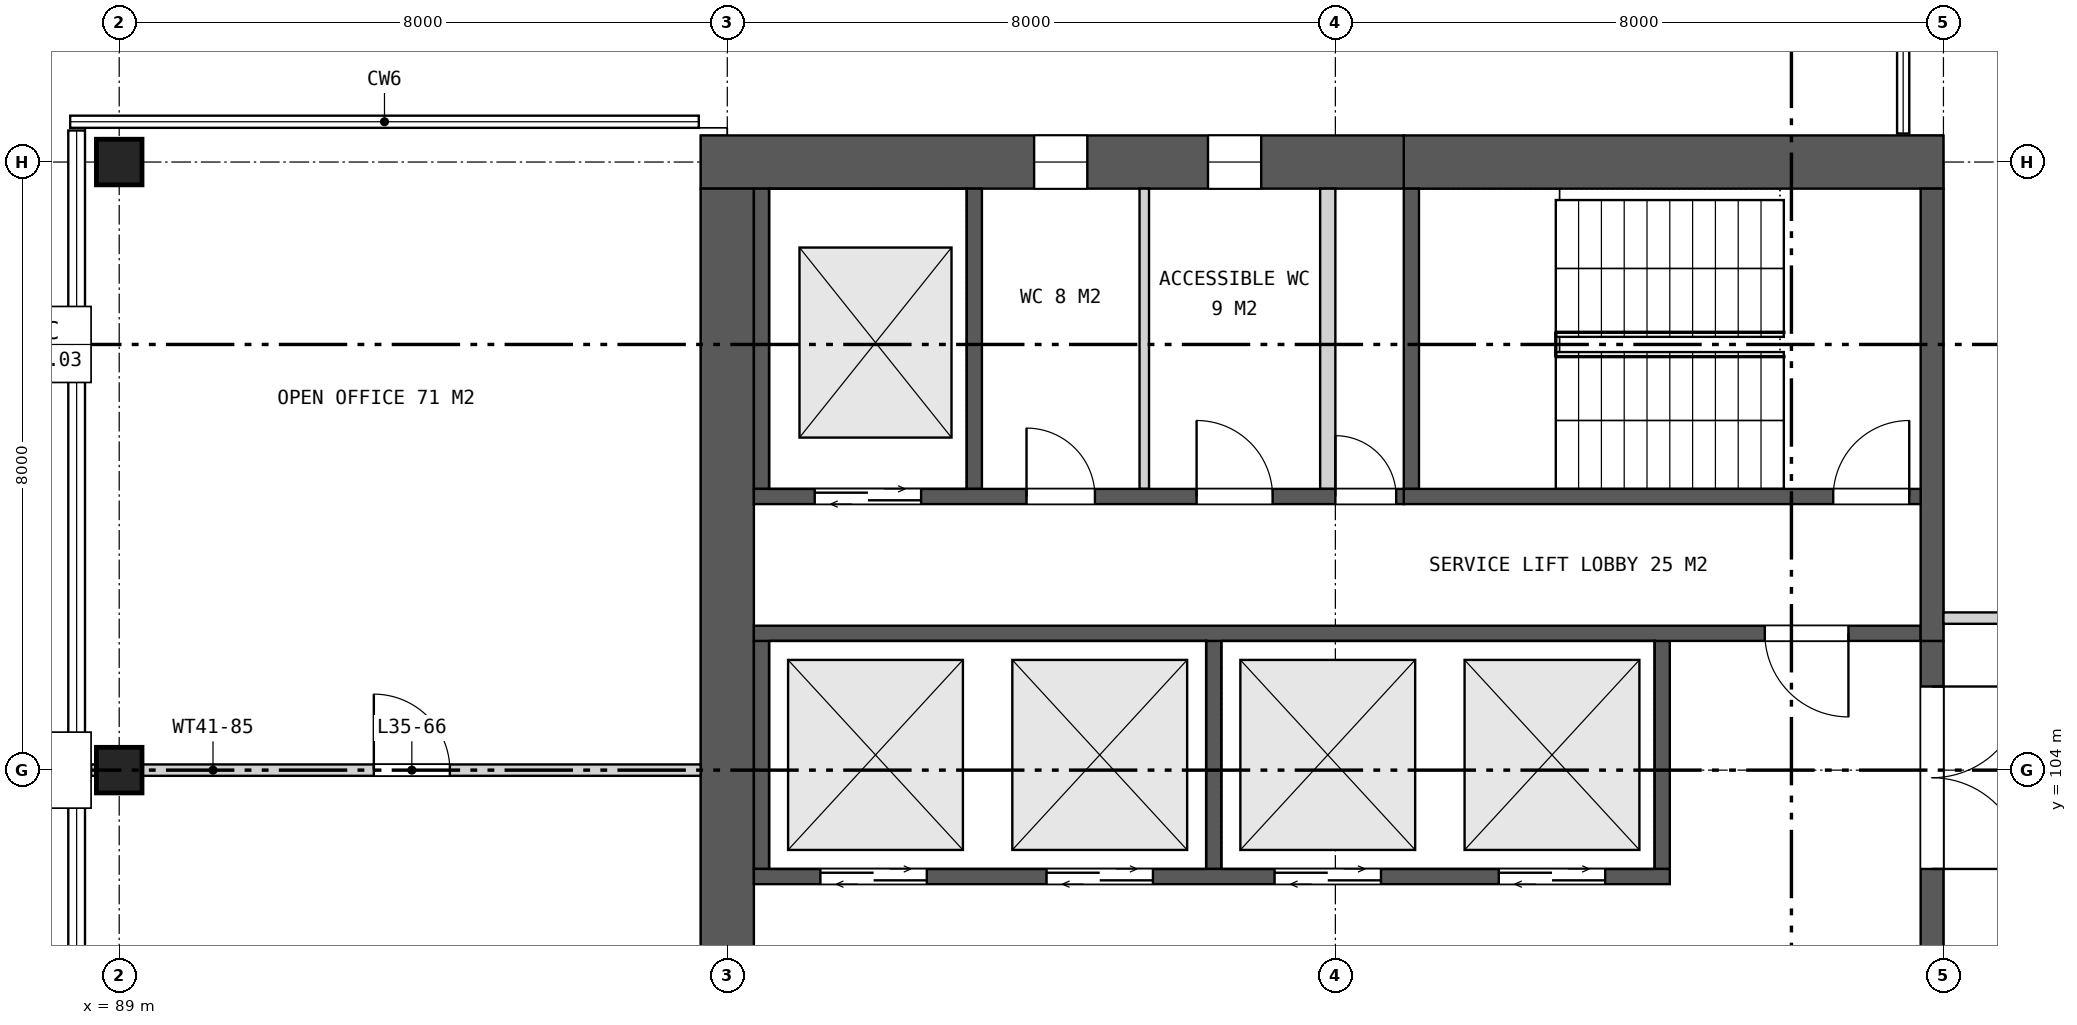
"""IFC4 building model, lengths in metres.
Left out: names, types, materials, properties, quantities, classifications, styles, units other than length and angle.
Written with IfcOpenShell. Run it as: python <this file> out.ifc"""

import sys

from ifc_helpers import new_model, si_unit, direction, frame, frame_2d, origin, origin_2d, place, context, subcontext, project, spatial, rectangle, extrude, element, fill, save


model = new_model("IFC4")
c1 = context("Model", 3, precision=1e-05, world=origin(), true_north=direction((0.0, 1.0)))
c2 = subcontext(c1, "Body", "Model", "MODEL_VIEW")
j1 = project(units=[si_unit("LENGTHUNIT", "METRE"), si_unit("PLANEANGLEUNIT", "RADIAN")], contexts=[c1])
p1 = place(None, origin())
s1 = spatial("IfcSite", under=j1, at=p1, CompositionType="ELEMENT")
p2 = place(p1, origin())
s2 = spatial("IfcBuilding", under=s1, at=p2, CompositionType="ELEMENT")
p3 = place(p2, frame((0.0, 0.0, 167.3)))
s3 = spatial("IfcBuildingStorey", under=s2, at=p3, CompositionType="ELEMENT", Elevation=167.3)
for number, where, z_axis, x_axis in (
    (1, (89.0, 104.0, 0.0), (0.0, 0.0, 1.0), (1.0, 0.0, 0.0)),
    (2, (89.0, 112.0, 0.0), (0.0, 0.0, 1.0), (1.0, 0.0, 0.0)),
):
    element("IfcColumn", number, at=place(p3, frame(where, z_axis=z_axis, x_axis=x_axis)), inside=s3, PredefinedType="COLUMN", context=c2, shape_type="SweptSolid", body=[
        extrude(rectangle(XDim=0.6, YDim=0.6, at=origin_2d()), origin(), (0.0, 0.0, 1.0), 4.2),
    ])
p4 = place(p3, frame((113.0, 112.0, 0.0), z_axis=(0.0, 0.0, 1.0), x_axis=(-1.0, 0.0, 0.0)))
e3 = element("IfcWall", 3, at=p4, inside=s3, PredefinedType="SHEAR", context=c2, shape_type="SweptSolid", body=[
    extrude(rectangle(XDim=7.1, YDim=0.7, at=frame_2d((3.55, 0.0))), origin(), (0.0, 0.0, 1.0), 4.2),
])
p5 = place(p3, frame((105.9, 112.0, 0.0), z_axis=(0.0, 0.0, 1.0), x_axis=(-1.0, 0.0, 0.0)))
e4 = element("IfcWall", 4, at=p5, inside=s3, PredefinedType="SHEAR", context=c2, shape_type="SweptSolid", body=[
    extrude(rectangle(XDim=9.25, YDim=0.7, at=frame_2d((4.625, 0.0))), origin(), (0.0, 0.0, 1.0), 4.2),
])
p6 = place(p5, frame((1.876, 0.0, 1.5)))
e5 = element("IfcOpeningElement", 5, at=p6, cuts=e4, PredefinedType="OPENING", context=c2, shape_type="SweptSolid", body=[
    extrude(rectangle(XDim=0.7, YDim=0.9, at=frame_2d((0.35, 0.45))), frame((0.0, 0.36, 0.0), z_axis=(0.0, -1.0, 0.0), x_axis=(1.0, 0.0, 0.0)), (0.0, 0.0, 1.0), 0.72),
])
p7 = place(p5, frame((4.163, 0.0, 1.5)))
e6 = element("IfcOpeningElement", 6, at=p7, cuts=e4, PredefinedType="OPENING", context=c2, shape_type="SweptSolid", body=[
    extrude(rectangle(XDim=0.7, YDim=0.9, at=frame_2d((0.35, 0.45))), frame((0.0, 0.36, 0.0), z_axis=(0.0, -1.0, 0.0), x_axis=(1.0, 0.0, 0.0)), (0.0, 0.0, 1.0), 0.72),
])
p8 = place(p3, frame((97.0, 111.65, 0.0), z_axis=(0.0, 0.0, 1.0), x_axis=(0.0, -1.0, 0.0)))
e7 = element("IfcWall", 7, at=p8, inside=s3, PredefinedType="SHEAR", context=c2, shape_type="SweptSolid", body=[
    extrude(rectangle(XDim=23.3, YDim=0.7, at=frame_2d((11.65, 0.0))), origin(), (0.0, 0.0, 1.0), 4.2),
])
p9 = place(p8, frame((10.45, 0.0, 0.0)))
e8 = element("IfcOpeningElement", 8, at=p9, cuts=e7, PredefinedType="OPENING", context=c2, shape_type="SweptSolid", body=[
    extrude(rectangle(XDim=2.4, YDim=2.4, at=frame_2d((1.2, 1.2))), frame((0.0, 0.36, 0.0), z_axis=(0.0, -1.0, 0.0), x_axis=(1.0, 0.0, 0.0)), (0.0, 0.0, 1.0), 0.72),
])
p10 = place(p3, frame((112.85, 105.7, 0.0), z_axis=(0.0, 0.0, 1.0), x_axis=(0.0, -1.0, 0.0)))
e9 = element("IfcWall", 9, at=p10, inside=s3, PredefinedType="SHEAR", context=c2, shape_type="SweptSolid", body=[
    extrude(rectangle(XDim=11.4, YDim=0.3, at=frame_2d((5.7, 0.0))), origin(), (0.0, 0.0, 1.0), 4.2),
])
p11 = place(p10, frame((0.6, 0.0, 0.0)))
e10 = element("IfcOpeningElement", 10, at=p11, cuts=e9, PredefinedType="OPENING", context=c2, shape_type="SweptSolid", body=[
    extrude(rectangle(XDim=2.4, YDim=2.4, at=frame_2d((1.2, 1.2))), frame((0.0, 0.16, 0.0), z_axis=(0.0, -1.0, 0.0), x_axis=(1.0, 0.0, 0.0)), (0.0, 0.0, 1.0), 0.32),
])
p12 = place(p10, frame((4.5, 0.0, 0.0)))
e11 = element("IfcOpeningElement", 11, at=p12, cuts=e9, PredefinedType="OPENING", context=c2, shape_type="SweptSolid", body=[
    extrude(rectangle(XDim=2.4, YDim=2.4, at=frame_2d((1.2, 1.2))), frame((0.0, 0.16, 0.0), z_axis=(0.0, -1.0, 0.0), x_axis=(1.0, 0.0, 0.0)), (0.0, 0.0, 1.0), 0.32),
])
p13 = place(p10, frame((8.4, 0.0, 0.0)))
e12 = element("IfcOpeningElement", 12, at=p13, cuts=e9, PredefinedType="OPENING", context=c2, shape_type="SweptSolid", body=[
    extrude(rectangle(XDim=2.4, YDim=2.4, at=frame_2d((1.2, 1.2))), frame((0.0, 0.16, 0.0), z_axis=(0.0, -1.0, 0.0), x_axis=(1.0, 0.0, 0.0)), (0.0, 0.0, 1.0), 0.32),
])
for number, where, z_axis, x_axis in (
    (13, (109.3, 105.7, 0.0), (0.0, 0.0, 1.0), (0.0, -1.0, 0.0)),
    (14, (103.4, 105.7, 0.0), (0.0, 0.0, 1.0), (0.0, -1.0, 0.0)),
    (15, (97.45, 105.7, 0.0), (0.0, 0.0, 1.0), (0.0, -1.0, 0.0)),
):
    element("IfcWall", number, at=place(p3, frame(where, z_axis=z_axis, x_axis=x_axis)), inside=s3, PredefinedType="SHEAR", context=c2, shape_type="SweptSolid", body=[
        extrude(rectangle(XDim=3.0, YDim=0.2, at=frame_2d((1.5, 0.0))), origin(), (0.0, 0.0, 1.0), 4.2),
    ])
p14 = place(p3, frame((109.4, 102.6, 0.0), z_axis=(0.0, 0.0, 1.0), x_axis=(-1.0, 0.0, 0.0)))
e16 = element("IfcWall", 16, at=p14, inside=s3, PredefinedType="SHEAR", context=c2, shape_type="SweptSolid", body=[
    extrude(rectangle(XDim=12.05, YDim=0.2, at=frame_2d((6.025, 0.0))), origin(), (0.0, 0.0, 1.0), 4.2),
])
p15 = place(p14, frame((0.85, 0.0, 0.0)))
e17 = element("IfcOpeningElement", 17, at=p15, cuts=e16, PredefinedType="OPENING", context=c2, shape_type="SweptSolid", body=[
    extrude(rectangle(XDim=1.4, YDim=2.1, at=frame_2d((0.7, 1.05))), frame((0.0, 0.11, 0.0), z_axis=(0.0, -1.0, 0.0), x_axis=(1.0, 0.0, 0.0)), (0.0, 0.0, 1.0), 0.22),
])
p16 = place(p14, frame((3.8, 0.0, 0.0)))
e18 = element("IfcOpeningElement", 18, at=p16, cuts=e16, PredefinedType="OPENING", context=c2, shape_type="SweptSolid", body=[
    extrude(rectangle(XDim=1.4, YDim=2.1, at=frame_2d((0.7, 1.05))), frame((0.0, 0.11, 0.0), z_axis=(0.0, -1.0, 0.0), x_axis=(1.0, 0.0, 0.0)), (0.0, 0.0, 1.0), 0.22),
])
p17 = place(p14, frame((6.8, 0.0, 0.0)))
e19 = element("IfcOpeningElement", 19, at=p17, cuts=e16, PredefinedType="OPENING", context=c2, shape_type="SweptSolid", body=[
    extrude(rectangle(XDim=1.4, YDim=2.1, at=frame_2d((0.7, 1.05))), frame((0.0, 0.11, 0.0), z_axis=(0.0, -1.0, 0.0), x_axis=(1.0, 0.0, 0.0)), (0.0, 0.0, 1.0), 0.22),
])
p18 = place(p14, frame((9.775, 0.0, 0.0)))
e20 = element("IfcOpeningElement", 20, at=p18, cuts=e16, PredefinedType="OPENING", context=c2, shape_type="SweptSolid", body=[
    extrude(rectangle(XDim=1.4, YDim=2.1, at=frame_2d((0.7, 1.05))), frame((0.0, 0.11, 0.0), z_axis=(0.0, -1.0, 0.0), x_axis=(1.0, 0.0, 0.0)), (0.0, 0.0, 1.0), 0.22),
])
p19 = place(p3, frame((112.7, 105.8, 0.0), z_axis=(0.0, 0.0, 1.0), x_axis=(-1.0, 0.0, 0.0)))
e21 = element("IfcWall", 21, at=p19, inside=s3, PredefinedType="SHEAR", context=c2, shape_type="SweptSolid", body=[
    extrude(rectangle(XDim=15.35, YDim=0.2, at=frame_2d((7.675, 0.0))), origin(), (0.0, 0.0, 1.0), 4.2),
])
p20 = place(p19, frame((0.95, 0.0, 0.0)))
e22 = element("IfcOpeningElement", 22, at=p20, cuts=e21, PredefinedType="OPENING", context=c2, shape_type="SweptSolid", body=[
    extrude(rectangle(XDim=1.1, YDim=2.1, at=frame_2d((0.55, 1.05))), frame((0.0, 0.11, 0.0), z_axis=(0.0, -1.0, 0.0), x_axis=(1.0, 0.0, 0.0)), (0.0, 0.0, 1.0), 0.22),
])
p21 = place(p3, frame((112.85, 111.65, 0.0), z_axis=(0.0, 0.0, 1.0), x_axis=(0.0, -1.0, 0.0)))
e23 = element("IfcWall", 23, at=p21, inside=s3, PredefinedType="SHEAR", context=c2, shape_type="SweptSolid", body=[
    extrude(rectangle(XDim=5.95, YDim=0.3, at=frame_2d((2.975, 0.0))), origin(), (0.0, 0.0, 1.0), 4.2),
])
for number, where, z_axis, x_axis in (
    (24, (106.0, 111.65, 0.0), (0.0, 0.0, 1.0), (0.0, -1.0, 0.0)),
    (25, (100.25, 111.65, 0.0), (0.0, 0.0, 1.0), (0.0, -1.0, 0.0)),
    (26, (97.45, 111.65, 0.0), (0.0, 0.0, 1.0), (0.0, -1.0, 0.0)),
):
    element("IfcWall", number, at=place(p3, frame(where, z_axis=z_axis, x_axis=x_axis)), inside=s3, PredefinedType="SHEAR", context=c2, shape_type="SweptSolid", body=[
        extrude(rectangle(XDim=3.95, YDim=0.2, at=frame_2d((1.975, 0.0))), origin(), (0.0, 0.0, 1.0), 4.2),
    ])
p22 = place(p3, frame((104.9, 111.65, 0.0), z_axis=(0.0, 0.0, 1.0), x_axis=(0.0, -1.0, 0.0)))
e27 = element("IfcWall", 27, at=p22, inside=s3, PredefinedType="PARTITIONING", context=c2, shape_type="SweptSolid", body=[
    extrude(rectangle(XDim=3.95, YDim=0.2, at=frame_2d((1.975, 0.0))), origin(), (0.0, 0.0, 1.0), 4.2),
])
p23 = place(p3, frame((102.486, 111.65, 0.0), z_axis=(0.0, 0.0, 1.0), x_axis=(0.0, -1.0, 0.0)))
e28 = element("IfcWall", 28, at=p23, inside=s3, PredefinedType="PARTITIONING", context=c2, shape_type="SweptSolid", body=[
    extrude(rectangle(XDim=3.95, YDim=0.125, at=frame_2d((1.975, 0.0))), origin(), (0.0, 0.0, 1.0), 4.2),
])
p24 = place(p3, frame((112.7, 107.6, 0.0), z_axis=(0.0, 0.0, 1.0), x_axis=(-1.0, 0.0, 0.0)))
e29 = element("IfcWall", 29, at=p24, inside=s3, PredefinedType="SHEAR", context=c2, shape_type="SweptSolid", body=[
    extrude(rectangle(XDim=6.8, YDim=0.2, at=frame_2d((3.4, 0.0))), origin(), (0.0, 0.0, 1.0), 4.2),
])
p25 = place(p24, frame((0.15, 0.0, 0.0)))
e30 = element("IfcOpeningElement", 30, at=p25, cuts=e29, PredefinedType="OPENING", context=c2, shape_type="SweptSolid", body=[
    extrude(rectangle(XDim=1.0, YDim=2.1, at=frame_2d((0.5, 1.05))), frame((0.0, 0.11, 0.0), z_axis=(0.0, -1.0, 0.0), x_axis=(1.0, 0.0, 0.0)), (0.0, 0.0, 1.0), 0.22),
])
p26 = place(p3, frame((105.9, 107.6, 0.0), z_axis=(0.0, 0.0, 1.0), x_axis=(-1.0, 0.0, 0.0)))
e31 = element("IfcWall", 31, at=p26, inside=s3, PredefinedType="SHEAR", context=c2, shape_type="SweptSolid", body=[
    extrude(rectangle(XDim=8.55, YDim=0.2, at=frame_2d((4.275, 0.0))), origin(), (0.0, 0.0, 1.0), 4.2),
])
p27 = place(p26, frame((0.1, 0.0, 0.0)))
e32 = element("IfcOpeningElement", 32, at=p27, cuts=e31, PredefinedType="OPENING", context=c2, shape_type="SweptSolid", body=[
    extrude(rectangle(XDim=0.8, YDim=2.1, at=frame_2d((0.4, 1.05))), frame((0.0, 0.11, 0.0), z_axis=(0.0, -1.0, 0.0), x_axis=(1.0, 0.0, 0.0)), (0.0, 0.0, 1.0), 0.22),
])
p28 = place(p26, frame((1.726, 0.0, 0.0)))
e33 = element("IfcOpeningElement", 33, at=p28, cuts=e31, PredefinedType="OPENING", context=c2, shape_type="SweptSolid", body=[
    extrude(rectangle(XDim=1.0, YDim=2.1, at=frame_2d((0.5, 1.05))), frame((0.0, 0.11, 0.0), z_axis=(0.0, -1.0, 0.0), x_axis=(1.0, 0.0, 0.0)), (0.0, 0.0, 1.0), 0.22),
])
p29 = place(p26, frame((4.063, 0.0, 0.0)))
e34 = element("IfcOpeningElement", 34, at=p29, cuts=e31, PredefinedType="OPENING", context=c2, shape_type="SweptSolid", body=[
    extrude(rectangle(XDim=0.9, YDim=2.1, at=frame_2d((0.45, 1.05))), frame((0.0, 0.11, 0.0), z_axis=(0.0, -1.0, 0.0), x_axis=(1.0, 0.0, 0.0)), (0.0, 0.0, 1.0), 0.22),
])
p30 = place(p26, frame((6.35, 0.0, 0.0)))
e35 = element("IfcOpeningElement", 35, at=p30, cuts=e31, PredefinedType="OPENING", context=c2, shape_type="SweptSolid", body=[
    extrude(rectangle(XDim=1.4, YDim=2.1, at=frame_2d((0.7, 1.05))), frame((0.0, 0.11, 0.0), z_axis=(0.0, -1.0, 0.0), x_axis=(1.0, 0.0, 0.0)), (0.0, 0.0, 1.0), 0.22),
])
p31 = place(p3, frame((88.63, 104.0, 0.0), z_axis=(0.0, 0.0, 1.0), x_axis=(1.0, 0.0, 0.0)))
e36 = element("IfcWall", 36, at=p31, inside=s3, PredefinedType="PARTITIONING", context=c2, shape_type="SweptSolid", body=[
    extrude(rectangle(XDim=8.02, YDim=0.15, at=frame_2d((4.01, 0.0))), origin(), (0.0, 0.0, 1.0), 3.26),
])
p32 = place(p31, frame((3.72, 0.0, 0.0)))
e37 = element("IfcOpeningElement", 37, at=p32, cuts=e36, PredefinedType="OPENING", context=c2, shape_type="SweptSolid", body=[
    extrude(rectangle(XDim=1.0, YDim=2.1, at=frame_2d((0.5, 1.05))), frame((0.0, 0.085, 0.0), z_axis=(0.0, -1.0, 0.0), x_axis=(1.0, 0.0, 0.0)), (0.0, 0.0, 1.0), 0.17),
])
p33 = place(p3, frame((113.0, 106.0, 0.0), z_axis=(0.0, 0.0, 1.0), x_axis=(1.0, 0.0, 0.0)))
e38 = element("IfcWall", 38, at=p33, inside=s3, PredefinedType="PARTITIONING", context=c2, shape_type="SweptSolid", body=[
    extrude(rectangle(XDim=10.725, YDim=0.15, at=frame_2d((5.363, 0.0))), origin(), (0.0, 0.0, 1.0), 3.26),
])
p34 = place(p6, origin())
e39 = element("IfcWindow", 39, at=p34, inside=s3, PartitioningType="SINGLE_PANEL", PredefinedType="WINDOW", context=c2, shape_type="SweptSolid", body=[
    extrude(rectangle(XDim=0.7, YDim=0.9, at=frame_2d((0.35, 0.45))), frame((0.0, 0.03, 0.0), z_axis=(0.0, -1.0, 0.0), x_axis=(1.0, 0.0, 0.0)), (0.0, 0.0, 1.0), 0.06),
])
fill(e5, e39)
p35 = place(p7, origin())
e40 = element("IfcWindow", 40, at=p35, inside=s3, PartitioningType="SINGLE_PANEL", PredefinedType="WINDOW", context=c2, shape_type="SweptSolid", body=[
    extrude(rectangle(XDim=0.7, YDim=0.9, at=frame_2d((0.35, 0.45))), frame((0.0, 0.03, 0.0), z_axis=(0.0, -1.0, 0.0), x_axis=(1.0, 0.0, 0.0)), (0.0, 0.0, 1.0), 0.06),
])
fill(e6, e40)
p36 = place(p11, origin())
e41 = element("IfcDoor", 41, at=p36, inside=s3, OperationType="DOUBLE_DOOR_SINGLE_SWING", PredefinedType="DOOR", context=c2, shape_type="SweptSolid", body=[
    extrude(rectangle(XDim=2.4, YDim=2.4, at=frame_2d((1.2, 1.2))), frame((0.0, 0.025, 0.0), z_axis=(0.0, -1.0, 0.0), x_axis=(1.0, 0.0, 0.0)), (0.0, 0.0, 1.0), 0.05),
])
fill(e10, e41)
p37 = place(p15, origin())
e42 = element("IfcDoor", 42, at=p37, inside=s3, OperationType="DOUBLE_DOOR_SLIDING", PredefinedType="DOOR", context=c2, shape_type="SweptSolid", body=[
    extrude(rectangle(XDim=1.4, YDim=2.1, at=frame_2d((0.7, 1.05))), frame((0.0, 0.025, 0.0), z_axis=(0.0, -1.0, 0.0), x_axis=(1.0, 0.0, 0.0)), (0.0, 0.0, 1.0), 0.05),
])
fill(e17, e42)
p38 = place(p16, origin())
e43 = element("IfcDoor", 43, at=p38, inside=s3, OperationType="DOUBLE_DOOR_SLIDING", PredefinedType="DOOR", context=c2, shape_type="SweptSolid", body=[
    extrude(rectangle(XDim=1.4, YDim=2.1, at=frame_2d((0.7, 1.05))), frame((0.0, 0.025, 0.0), z_axis=(0.0, -1.0, 0.0), x_axis=(1.0, 0.0, 0.0)), (0.0, 0.0, 1.0), 0.05),
])
fill(e18, e43)
p39 = place(p17, origin())
e44 = element("IfcDoor", 44, at=p39, inside=s3, OperationType="DOUBLE_DOOR_SLIDING", PredefinedType="DOOR", context=c2, shape_type="SweptSolid", body=[
    extrude(rectangle(XDim=1.4, YDim=2.1, at=frame_2d((0.7, 1.05))), frame((0.0, 0.025, 0.0), z_axis=(0.0, -1.0, 0.0), x_axis=(1.0, 0.0, 0.0)), (0.0, 0.0, 1.0), 0.05),
])
fill(e19, e44)
p40 = place(p18, origin())
e45 = element("IfcDoor", 45, at=p40, inside=s3, OperationType="DOUBLE_DOOR_SLIDING", PredefinedType="DOOR", context=c2, shape_type="SweptSolid", body=[
    extrude(rectangle(XDim=1.4, YDim=2.1, at=frame_2d((0.7, 1.05))), frame((0.0, 0.025, 0.0), z_axis=(0.0, -1.0, 0.0), x_axis=(1.0, 0.0, 0.0)), (0.0, 0.0, 1.0), 0.05),
])
fill(e20, e45)
p41 = place(p20, origin())
e46 = element("IfcDoor", 46, at=p41, inside=s3, OperationType="SINGLE_SWING_LEFT", PredefinedType="DOOR", context=c2, shape_type="SweptSolid", body=[
    extrude(rectangle(XDim=1.1, YDim=2.1, at=frame_2d((0.55, 1.05))), frame((0.0, 0.025, 0.0), z_axis=(0.0, -1.0, 0.0), x_axis=(1.0, 0.0, 0.0)), (0.0, 0.0, 1.0), 0.05),
])
fill(e22, e46)
p42 = place(p25, frame((1.0, 0.0, 0.0), z_axis=(0.0, 0.0, 1.0), x_axis=(-1.0, 0.0, 0.0)))
e47 = element("IfcDoor", 47, at=p42, inside=s3, OperationType="SINGLE_SWING_RIGHT", PredefinedType="DOOR", context=c2, shape_type="SweptSolid", body=[
    extrude(rectangle(XDim=1.0, YDim=2.1, at=frame_2d((0.5, 1.05))), frame((0.0, 0.025, 0.0), z_axis=(0.0, -1.0, 0.0), x_axis=(1.0, 0.0, 0.0)), (0.0, 0.0, 1.0), 0.05),
])
fill(e30, e47)
p43 = place(p27, frame((0.8, 0.0, 0.0), z_axis=(0.0, 0.0, 1.0), x_axis=(-1.0, 0.0, 0.0)))
e48 = element("IfcDoor", 48, at=p43, inside=s3, OperationType="SINGLE_SWING_LEFT", PredefinedType="DOOR", context=c2, shape_type="SweptSolid", body=[
    extrude(rectangle(XDim=0.8, YDim=2.1, at=frame_2d((0.4, 1.05))), frame((0.0, 0.025, 0.0), z_axis=(0.0, -1.0, 0.0), x_axis=(1.0, 0.0, 0.0)), (0.0, 0.0, 1.0), 0.05),
])
fill(e32, e48)
p44 = place(p28, frame((1.0, 0.0, 0.0), z_axis=(0.0, 0.0, 1.0), x_axis=(-1.0, 0.0, 0.0)))
e49 = element("IfcDoor", 49, at=p44, inside=s3, OperationType="SINGLE_SWING_LEFT", PredefinedType="DOOR", context=c2, shape_type="SweptSolid", body=[
    extrude(rectangle(XDim=1.0, YDim=2.1, at=frame_2d((0.5, 1.05))), frame((0.0, 0.025, 0.0), z_axis=(0.0, -1.0, 0.0), x_axis=(1.0, 0.0, 0.0)), (0.0, 0.0, 1.0), 0.05),
])
fill(e33, e49)
p45 = place(p29, frame((0.9, 0.0, 0.0), z_axis=(0.0, 0.0, 1.0), x_axis=(-1.0, 0.0, 0.0)))
e50 = element("IfcDoor", 50, at=p45, inside=s3, OperationType="SINGLE_SWING_LEFT", PredefinedType="DOOR", context=c2, shape_type="SweptSolid", body=[
    extrude(rectangle(XDim=0.9, YDim=2.1, at=frame_2d((0.45, 1.05))), frame((0.0, 0.025, 0.0), z_axis=(0.0, -1.0, 0.0), x_axis=(1.0, 0.0, 0.0)), (0.0, 0.0, 1.0), 0.05),
])
fill(e34, e50)
p46 = place(p30, origin())
e51 = element("IfcDoor", 51, at=p46, inside=s3, OperationType="DOUBLE_DOOR_SLIDING", PredefinedType="DOOR", context=c2, shape_type="SweptSolid", body=[
    extrude(rectangle(XDim=1.4, YDim=2.1, at=frame_2d((0.7, 1.05))), frame((0.0, 0.025, 0.0), z_axis=(0.0, -1.0, 0.0), x_axis=(1.0, 0.0, 0.0)), (0.0, 0.0, 1.0), 0.05),
])
fill(e35, e51)
p47 = place(p32, origin())
e52 = element("IfcDoor", 52, at=p47, inside=s3, OperationType="SINGLE_SWING_LEFT", PredefinedType="DOOR", context=c2, shape_type="SweptSolid", body=[
    extrude(rectangle(XDim=1.0, YDim=2.1, at=frame_2d((0.5, 1.05))), frame((0.0, 0.025, 0.0), z_axis=(0.0, -1.0, 0.0), x_axis=(1.0, 0.0, 0.0)), (0.0, 0.0, 1.0), 0.05),
])
fill(e37, e52)
save(model, sys.argv[1])
